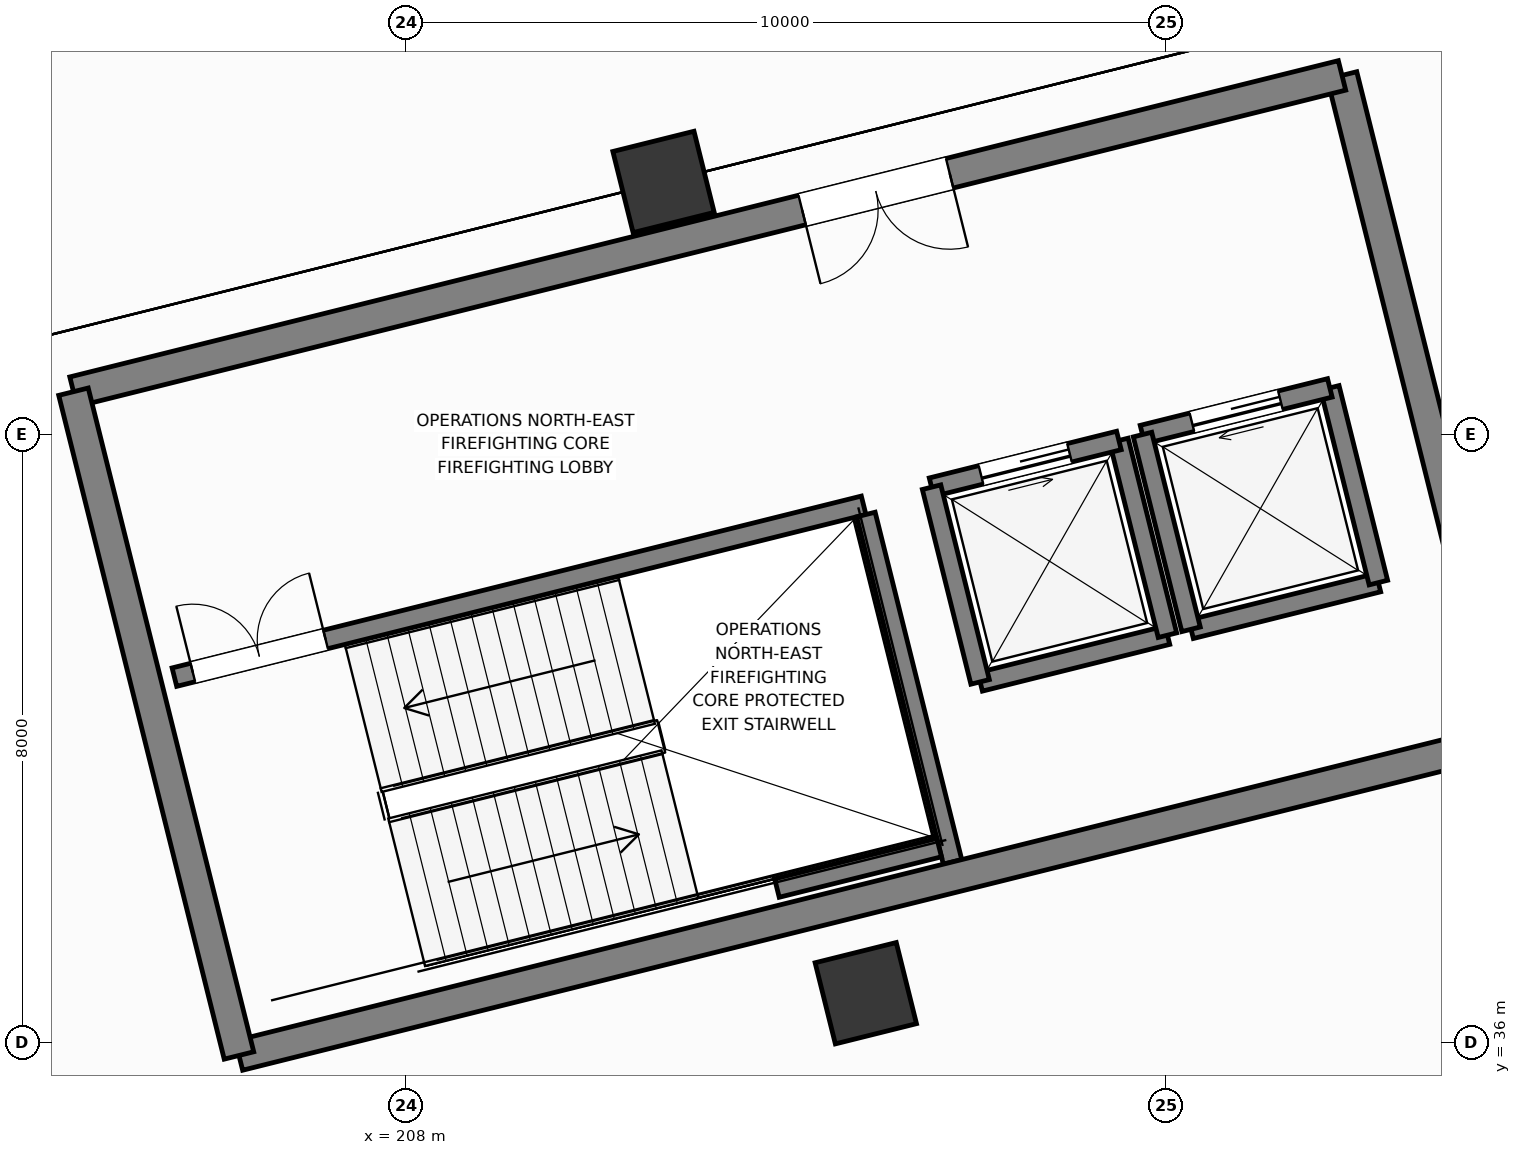
"""IFC4 building model, lengths in metres.
Left out: names, types, materials, properties, quantities, classifications, styles, units other than length and angle.
Written with IfcOpenShell. Run it as: python <this file> out.ifc"""

import sys

from ifc_helpers import new_model, si_unit, direction, frame, frame_2d, origin, origin_2d, place, context, subcontext, project, spatial, rectangle, extrude, element, fill, save


model = new_model("IFC4")
c1 = context("Model", 3, precision=1e-05, world=origin(), true_north=direction((0.0, 1.0)))
c2 = subcontext(c1, "Body", "Model", "MODEL_VIEW")
j1 = project(units=[si_unit("LENGTHUNIT", "METRE"), si_unit("PLANEANGLEUNIT", "RADIAN")], contexts=[c1])
p1 = place(None, origin())
s1 = spatial("IfcSite", under=j1, at=p1, CompositionType="ELEMENT")
p2 = place(p1, origin())
s2 = spatial("IfcBuilding", under=s1, at=p2, CompositionType="ELEMENT")
p3 = place(p2, frame((0.0, 0.0, 11.4)))
s3 = spatial("IfcBuildingStorey", under=s2, at=p3, CompositionType="ELEMENT", Elevation=11.4)
for number, where, z_axis, x_axis in (
    (1, (214.044, 36.652, 0.0), (0.0, 0.0, 1.0), (0.97, 0.242, 0.0)),
    (2, (211.383, 47.325, 0.0), (0.0, 0.0, 1.0), (0.97, 0.242, 0.0)),
):
    element("IfcColumn", number, at=place(p3, frame(where, z_axis=z_axis, x_axis=x_axis)), inside=s3, PredefinedType="COLUMN", context=c2, shape_type="SweptSolid", body=[
        extrude(rectangle(XDim=1.1, YDim=1.1, at=origin_2d()), origin(), (0.0, 0.0, 1.0), 4.8),
    ])
p4 = place(p3, frame((215.548, 40.748, 0.0), z_axis=(0.0, 0.0, 1.0), x_axis=(0.97029284861, 0.241933436994, 0.0)))
e3 = element("IfcWall", 3, at=p4, inside=s3, PredefinedType="SOLIDWALL", context=c2, shape_type="SweptSolid", body=[
    extrude(rectangle(XDim=2.54, YDim=0.25, at=frame_2d((1.27, 0.0))), origin(), (0.0, 0.0, 1.0), 4.46),
])
p5 = place(p3, frame((218.012, 41.362, 0.0), z_axis=(0.0, 0.0, 1.0), x_axis=(-0.241938414856, 0.970291607413, 0.0)))
e4 = element("IfcWall", 4, at=p5, inside=s3, PredefinedType="SOLIDWALL", context=c2, shape_type="SweptSolid", body=[
    extrude(rectangle(XDim=2.64, YDim=0.25, at=frame_2d((1.32, 0.0))), origin(), (0.0, 0.0, 1.0), 4.46),
])
p6 = place(p3, frame((217.374, 43.924, 0.0), z_axis=(0.0, 0.0, 1.0), x_axis=(-0.97029284861, -0.241933436994, 0.0)))
e5 = element("IfcWall", 5, at=p6, inside=s3, PredefinedType="SOLIDWALL", context=c2, shape_type="SweptSolid", body=[
    extrude(rectangle(XDim=2.54, YDim=0.25, at=frame_2d((1.27, 0.0))), origin(), (0.0, 0.0, 1.0), 4.46),
])
p7 = place(p6, frame((0.67, 0.0, 0.0)))
e6 = element("IfcOpeningElement", 6, at=p7, cuts=e5, PredefinedType="OPENING", context=c2, shape_type="SweptSolid", body=[
    extrude(rectangle(XDim=1.2, YDim=2.2, at=frame_2d((0.6, 1.1))), frame((0.0, 0.135, 0.0), z_axis=(0.0, -1.0, 0.0), x_axis=(1.0, 0.0, 0.0)), (0.0, 0.0, 1.0), 0.27),
])
p8 = place(p3, frame((214.909, 43.309, 0.0), z_axis=(0.0, 0.0, 1.0), x_axis=(0.241938414856, -0.970291607413, 0.0)))
e7 = element("IfcWall", 7, at=p8, inside=s3, PredefinedType="SOLIDWALL", context=c2, shape_type="SweptSolid", body=[
    extrude(rectangle(XDim=2.64, YDim=0.25, at=frame_2d((1.32, 0.0))), origin(), (0.0, 0.0, 1.0), 4.46),
])
p9 = place(p3, frame((218.323, 41.44, 0.0), z_axis=(0.0, 0.0, 1.0), x_axis=(0.97029284861, 0.241933436994, 0.0)))
e8 = element("IfcWall", 8, at=p9, inside=s3, PredefinedType="SOLIDWALL", context=c2, shape_type="SweptSolid", body=[
    extrude(rectangle(XDim=2.54, YDim=0.25, at=frame_2d((1.27, 0.0))), origin(), (0.0, 0.0, 1.0), 4.46),
])
p10 = place(p3, frame((220.787, 42.054, 0.0), z_axis=(0.0, 0.0, 1.0), x_axis=(-0.241938414856, 0.970291607413, 0.0)))
e9 = element("IfcWall", 9, at=p10, inside=s3, PredefinedType="SOLIDWALL", context=c2, shape_type="SweptSolid", body=[
    extrude(rectangle(XDim=2.64, YDim=0.25, at=frame_2d((1.32, 0.0))), origin(), (0.0, 0.0, 1.0), 4.46),
])
p11 = place(p3, frame((220.149, 44.616, 0.0), z_axis=(0.0, 0.0, 1.0), x_axis=(-0.97029284861, -0.241933436994, 0.0)))
e10 = element("IfcWall", 10, at=p11, inside=s3, PredefinedType="SOLIDWALL", context=c2, shape_type="SweptSolid", body=[
    extrude(rectangle(XDim=2.54, YDim=0.25, at=frame_2d((1.27, 0.0))), origin(), (0.0, 0.0, 1.0), 4.46),
])
p12 = place(p11, frame((0.67, 0.0, 0.0)))
e11 = element("IfcOpeningElement", 11, at=p12, cuts=e10, PredefinedType="OPENING", context=c2, shape_type="SweptSolid", body=[
    extrude(rectangle(XDim=1.2, YDim=2.2, at=frame_2d((0.6, 1.1))), frame((0.0, 0.135, 0.0), z_axis=(0.0, -1.0, 0.0), x_axis=(1.0, 0.0, 0.0)), (0.0, 0.0, 1.0), 0.27),
])
p13 = place(p3, frame((217.684, 44.001, 0.0), z_axis=(0.0, 0.0, 1.0), x_axis=(0.241938414856, -0.970291607413, 0.0)))
e12 = element("IfcWall", 12, at=p13, inside=s3, PredefinedType="SOLIDWALL", context=c2, shape_type="SweptSolid", body=[
    extrude(rectangle(XDim=2.64, YDim=0.25, at=frame_2d((1.32, 0.0))), origin(), (0.0, 0.0, 1.0), 4.46),
])
p14 = place(p3, frame((204.948, 40.81, 0.0), z_axis=(0.0, 0.0, 1.0), x_axis=(0.970297151331, 0.241916179943, 0.0)))
e13 = element("IfcWall", 13, at=p14, inside=s3, PredefinedType="SOLIDWALL", context=c2, shape_type="SweptSolid", body=[
    extrude(rectangle(XDim=9.345, YDim=0.25, at=frame_2d((4.673, 0.0))), origin(), (0.0, 0.0, 1.0), 4.43),
])
p15 = place(p14, frame((0.25, 0.0, 0.0)))
e14 = element("IfcOpeningElement", 14, at=p15, cuts=e13, PredefinedType="OPENING", context=c2, shape_type="SweptSolid", body=[
    extrude(rectangle(XDim=1.8, YDim=2.25, at=frame_2d((0.9, 1.125))), frame((0.0, 0.135, 0.0), z_axis=(0.0, -1.0, 0.0), x_axis=(1.0, 0.0, 0.0)), (0.0, 0.0, 1.0), 0.27),
])
p16 = place(p3, frame((215.185, 38.38, 0.0), z_axis=(0.0, 0.0, 1.0), x_axis=(-0.241911120435, 0.970298412763, 0.0)))
e15 = element("IfcWall", 15, at=p16, inside=s3, PredefinedType="SOLIDWALL", context=c2, shape_type="SweptSolid", body=[
    extrude(rectangle(XDim=4.71, YDim=0.25, at=frame_2d((2.355, 0.0))), origin(), (0.0, 0.0, 1.0), 4.43),
])
p17 = place(p3, frame((212.875, 38.035, 0.0), z_axis=(0.0, 0.0, 1.0), x_axis=(0.97029738597, 0.241915238833, 0.0)))
e16 = element("IfcWall", 16, at=p17, inside=s3, PredefinedType="SOLIDWALL", context=c2, shape_type="SweptSolid", body=[
    extrude(rectangle(XDim=2.2, YDim=0.25, at=frame_2d((1.1, 0.0))), origin(), (0.0, 0.0, 1.0), 4.43),
])
p18 = place(p3, frame((205.797, 35.833, 0.0), z_axis=(0.0, 0.0, 1.0), x_axis=(0.970295179998, 0.241924086589, 0.0)))
e17 = element("IfcWall", 17, at=p18, inside=s3, PredefinedType="SHEAR", context=c2, shape_type="SweptSolid", body=[
    extrude(rectangle(XDim=17.2, YDim=0.4, at=frame_2d((8.6, 0.0))), origin(), (0.0, 0.0, 1.0), 4.46),
])
p19 = place(p3, frame((222.486, 39.994, 0.0), z_axis=(0.0, 0.0, 1.0), x_axis=(-0.241923808098, 0.970295249435, 0.0)))
e18 = element("IfcWall", 18, at=p19, inside=s3, PredefinedType="SHEAR", context=c2, shape_type="SweptSolid", body=[
    extrude(rectangle(XDim=9.0, YDim=0.4, at=frame_2d((4.5, 0.0))), origin(), (0.0, 0.0, 1.0), 4.46),
])
p20 = place(p3, frame((220.309, 48.727, 0.0), z_axis=(0.0, 0.0, 1.0), x_axis=(-0.970296544738, -0.241918612906, 0.0)))
e19 = element("IfcWall", 19, at=p20, inside=s3, PredefinedType="SHEAR", context=c2, shape_type="SweptSolid", body=[
    extrude(rectangle(XDim=17.2, YDim=0.4, at=frame_2d((8.6, 0.0))), origin(), (0.0, 0.0, 1.0), 4.46),
])
p21 = place(p20, frame((5.32, 0.0, 0.0)))
e20 = element("IfcOpeningElement", 20, at=p21, cuts=e19, PredefinedType="OPENING", context=c2, shape_type="SweptSolid", body=[
    extrude(rectangle(XDim=2.0, YDim=2.3, at=frame_2d((1.0, 1.15))), frame((0.0, 0.21, 0.0), z_axis=(0.0, -1.0, 0.0), x_axis=(1.0, 0.0, 0.0)), (0.0, 0.0, 1.0), 0.42),
])
p22 = place(p3, frame((203.62, 44.566, 0.0), z_axis=(0.0, 0.0, 1.0), x_axis=(0.241921199913, -0.97029589973, 0.0)))
e21 = element("IfcWall", 21, at=p22, inside=s3, PredefinedType="SHEAR", context=c2, shape_type="SweptSolid", body=[
    extrude(rectangle(XDim=9.0, YDim=0.4, at=frame_2d((4.5, 0.0))), origin(), (0.0, 0.0, 1.0), 4.46),
])
p23 = place(p7, origin())
e22 = element("IfcDoor", 22, at=p23, inside=s3, OperationType="SLIDING_TO_LEFT", PredefinedType="DOOR", context=c2, shape_type="SweptSolid", body=[
    extrude(rectangle(XDim=1.2, YDim=2.2, at=frame_2d((0.6, 1.1))), frame((0.0, 0.025, 0.0), z_axis=(0.0, -1.0, 0.0), x_axis=(1.0, 0.0, 0.0)), (0.0, 0.0, 1.0), 0.05),
])
fill(e6, e22)
p24 = place(p12, origin())
e23 = element("IfcDoor", 23, at=p24, inside=s3, OperationType="SLIDING_TO_RIGHT", PredefinedType="DOOR", context=c2, shape_type="SweptSolid", body=[
    extrude(rectangle(XDim=1.2, YDim=2.2, at=frame_2d((0.6, 1.1))), frame((0.0, 0.025, 0.0), z_axis=(0.0, -1.0, 0.0), x_axis=(1.0, 0.0, 0.0)), (0.0, 0.0, 1.0), 0.05),
])
fill(e11, e23)
p25 = place(p15, origin())
e24 = element("IfcDoor", 24, at=p25, inside=s3, OperationType="DOUBLE_DOOR_SINGLE_SWING", PredefinedType="DOOR", context=c2, shape_type="SweptSolid", body=[
    extrude(rectangle(XDim=1.8, YDim=2.25, at=frame_2d((0.9, 1.125))), frame((0.0, 0.025, 0.0), z_axis=(0.0, -1.0, 0.0), x_axis=(1.0, 0.0, 0.0)), (0.0, 0.0, 1.0), 0.05),
])
fill(e14, e24)
p26 = place(p21, origin())
e25 = element("IfcDoor", 25, at=p26, inside=s3, OperationType="DOUBLE_DOOR_SINGLE_SWING", PredefinedType="DOOR", context=c2, shape_type="SweptSolid", body=[
    extrude(rectangle(XDim=2.0, YDim=2.3, at=frame_2d((1.0, 1.15))), frame((0.0, 0.025, 0.0), z_axis=(0.0, -1.0, 0.0), x_axis=(1.0, 0.0, 0.0)), (0.0, 0.0, 1.0), 0.05),
])
fill(e20, e25)
save(model, sys.argv[1])
